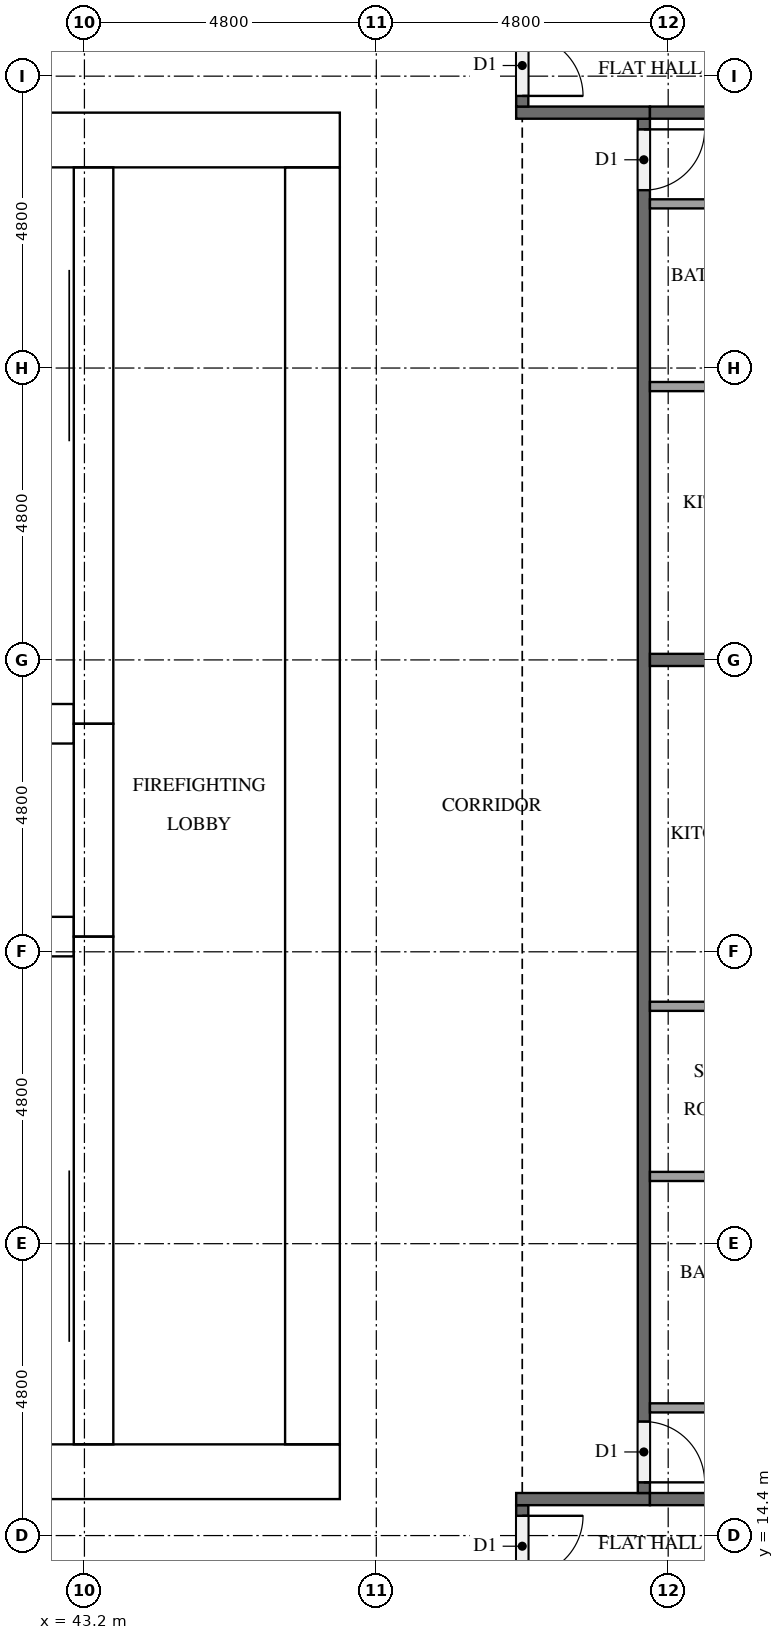
"""IFC4 building model, lengths in metres.
Left out: names, types, materials, properties, quantities, classifications, styles, units other than length and angle.
Written with IfcOpenShell. Run it as: python <this file> out.ifc"""

import sys

from ifc_helpers import new_model, si_unit, direction, frame, frame_2d, origin, place, context, subcontext, project, spatial, rectangle, extrude, element, fill, save


model = new_model("IFC4")
c1 = context("Model", 3, precision=1e-05, world=origin(), true_north=direction((0.0, 1.0)))
c2 = subcontext(c1, "Body", "Model", "MODEL_VIEW")
j1 = project(units=[si_unit("LENGTHUNIT", "METRE"), si_unit("PLANEANGLEUNIT", "RADIAN")], contexts=[c1])
p1 = place(None, origin())
s1 = spatial("IfcSite", under=j1, at=p1, CompositionType="ELEMENT")
p2 = place(p1, origin())
s2 = spatial("IfcBuilding", under=s1, at=p2, CompositionType="ELEMENT")
p3 = place(p2, frame((0.0, 0.0, 96.2)))
s3 = spatial("IfcBuildingStorey", under=s2, at=p3, CompositionType="ELEMENT", Elevation=96.2)
p4 = place(p3, frame((15.0, 15.45, 0.0), z_axis=(0.0, 0.0, 1.0), x_axis=(1.0, 0.0, 0.0)))
e1 = element("IfcWall", 1, at=p4, inside=s3, PredefinedType="SHEAR", context=c2, shape_type="SweptSolid", body=[
    extrude(rectangle(XDim=32.4, YDim=0.9, at=frame_2d((16.2, 0.0))), origin(), (0.0, 0.0, 1.0), 3.2),
])
p5 = place(p4, frame((15.3, 0.0, 0.0)))
e2 = element("IfcOpeningElement", 2, at=p5, cuts=e1, PredefinedType="OPENING", context=c2, shape_type="SweptSolid", body=[
    extrude(rectangle(XDim=1.8, YDim=2.1, at=frame_2d((0.9, 1.05))), frame((0.0, 0.46, 0.0), z_axis=(0.0, -1.0, 0.0), x_axis=(1.0, 0.0, 0.0)), (0.0, 0.0, 1.0), 0.92),
])
p6 = place(p3, frame((15.0, 37.35, 0.0), z_axis=(0.0, 0.0, 1.0), x_axis=(1.0, 0.0, 0.0)))
e3 = element("IfcWall", 3, at=p6, inside=s3, PredefinedType="SHEAR", context=c2, shape_type="SweptSolid", body=[
    extrude(rectangle(XDim=32.4, YDim=0.9, at=frame_2d((16.2, 0.0))), origin(), (0.0, 0.0, 1.0), 3.2),
])
p7 = place(p6, frame((15.3, 0.0, 0.0)))
e4 = element("IfcOpeningElement", 4, at=p7, cuts=e3, PredefinedType="OPENING", context=c2, shape_type="SweptSolid", body=[
    extrude(rectangle(XDim=1.8, YDim=2.1, at=frame_2d((0.9, 1.05))), frame((0.0, 0.46, 0.0), z_axis=(0.0, -1.0, 0.0), x_axis=(1.0, 0.0, 0.0)), (0.0, 0.0, 1.0), 0.92),
])
p8 = place(p6, frame((1.794, 0.0, 0.0)))
e5 = element("IfcOpeningElement", 5, at=p8, cuts=e3, PredefinedType="OPENING", context=c2, shape_type="SweptSolid", body=[
    extrude(rectangle(XDim=1.0, YDim=2.1, at=frame_2d((0.5, 1.05))), frame((0.0, 0.46, 0.0), z_axis=(0.0, -1.0, 0.0), x_axis=(1.0, 0.0, 0.0)), (0.0, 0.0, 1.0), 0.92),
])
p9 = place(p6, frame((5.331, 0.0, 0.0)))
e6 = element("IfcOpeningElement", 6, at=p9, cuts=e3, PredefinedType="OPENING", context=c2, shape_type="SweptSolid", body=[
    extrude(rectangle(XDim=1.0, YDim=2.1, at=frame_2d((0.5, 1.05))), frame((0.0, 0.46, 0.0), z_axis=(0.0, -1.0, 0.0), x_axis=(1.0, 0.0, 0.0)), (0.0, 0.0, 1.0), 0.92),
])
p10 = place(p3, frame((46.95, 15.9, 0.0), z_axis=(0.0, 0.0, 1.0), x_axis=(0.0, 1.0, 0.0)))
e7 = element("IfcWall", 7, at=p10, inside=s3, PredefinedType="SHEAR", context=c2, shape_type="SweptSolid", body=[
    extrude(rectangle(XDim=21.0, YDim=0.9, at=frame_2d((10.5, 0.0))), origin(), (0.0, 0.0, 1.0), 3.2),
])
p11 = place(p10, frame((10.2, 0.0, 0.0)))
e8 = element("IfcOpeningElement", 8, at=p11, cuts=e7, PredefinedType="OPENING", context=c2, shape_type="SweptSolid", body=[
    extrude(rectangle(XDim=1.2, YDim=2.1, at=frame_2d((0.6, 1.05))), frame((0.0, 0.46, 0.0), z_axis=(0.0, -1.0, 0.0), x_axis=(1.0, 0.0, 0.0)), (0.0, 0.0, 1.0), 0.92),
])
p12 = place(p3, frame((43.35, 15.9, 0.0), z_axis=(0.0, 0.0, 1.0), x_axis=(0.0, 1.0, 0.0)))
e9 = element("IfcWall", 9, at=p12, inside=s3, PredefinedType="SHEAR", context=c2, shape_type="SweptSolid", body=[
    extrude(rectangle(XDim=8.35, YDim=0.65, at=frame_2d((4.175, 0.0))), origin(), (0.0, 0.0, 1.0), 3.2),
])
p13 = place(p12, frame((0.3, 0.0, 0.0)))
e10 = element("IfcOpeningElement", 10, at=p13, cuts=e9, PredefinedType="OPENING", context=c2, shape_type="SweptSolid", body=[
    extrude(rectangle(XDim=1.2, YDim=2.1, at=frame_2d((0.6, 1.05))), frame((0.0, 0.335, 0.0), z_axis=(0.0, -1.0, 0.0), x_axis=(1.0, 0.0, 0.0)), (0.0, 0.0, 1.0), 0.67),
])
p14 = place(p3, frame((43.35, 24.25, 0.0), z_axis=(0.0, 0.0, 1.0), x_axis=(0.0, 1.0, 0.0)))
e11 = element("IfcWall", 11, at=p14, inside=s3, PredefinedType="SHEAR", context=c2, shape_type="SweptSolid", body=[
    extrude(rectangle(XDim=3.5, YDim=0.65, at=frame_2d((1.75, 0.0))), origin(), (0.0, 0.0, 1.0), 3.2),
])
p15 = place(p14, frame((1.2, 0.0, 0.0)))
e12 = element("IfcOpeningElement", 12, at=p15, cuts=e11, PredefinedType="OPENING", context=c2, shape_type="SweptSolid", body=[
    extrude(rectangle(XDim=1.1, YDim=2.1, at=frame_2d((0.55, 1.05))), frame((0.0, 0.335, 0.0), z_axis=(0.0, -1.0, 0.0), x_axis=(1.0, 0.0, 0.0)), (0.0, 0.0, 1.0), 0.67),
])
p16 = place(p3, frame((43.35, 27.75, 0.0), z_axis=(0.0, 0.0, 1.0), x_axis=(0.0, 1.0, 0.0)))
e13 = element("IfcWall", 13, at=p16, inside=s3, PredefinedType="SHEAR", context=c2, shape_type="SweptSolid", body=[
    extrude(rectangle(XDim=9.15, YDim=0.65, at=frame_2d((4.575, 0.0))), origin(), (0.0, 0.0, 1.0), 3.2),
])
p17 = place(p16, frame((7.65, 0.0, 0.0)))
e14 = element("IfcOpeningElement", 14, at=p17, cuts=e13, PredefinedType="OPENING", context=c2, shape_type="SweptSolid", body=[
    extrude(rectangle(XDim=1.2, YDim=2.1, at=frame_2d((0.6, 1.05))), frame((0.0, 0.335, 0.0), z_axis=(0.0, -1.0, 0.0), x_axis=(1.0, 0.0, 0.0)), (0.0, 0.0, 1.0), 0.67),
])
for number, where, z_axis, x_axis in (
    (15, (39.625, 24.25, 0.0), (0.0, 0.0, 1.0), (1.0, 0.0, 0.0)),
    (16, (39.625, 27.75, 0.0), (0.0, 0.0, 1.0), (1.0, 0.0, 0.0)),
):
    element("IfcWall", number, at=place(p3, frame(where, z_axis=z_axis, x_axis=x_axis)), inside=s3, PredefinedType="SHEAR", context=c2, shape_type="SweptSolid", body=[
        extrude(rectangle(XDim=3.4, YDim=0.65, at=frame_2d((1.7, 0.0))), origin(), (0.0, 0.0, 1.0), 3.2),
    ])
p18 = place(p3, frame((50.4, 14.9, 0.0), z_axis=(0.0, 0.0, 1.0), x_axis=(0.0, -1.0, 0.0)))
e17 = element("IfcWall", 17, at=p18, inside=s3, PredefinedType="PARTITIONING", context=c2, shape_type="SweptSolid", body=[
    extrude(rectangle(XDim=2.8, YDim=0.2, at=frame_2d((1.4, 0.0))), origin(), (0.0, 0.0, 1.0), 3.2),
])
p19 = place(p18, frame((0.175, 0.0, 0.0)))
e18 = element("IfcOpeningElement", 18, at=p19, cuts=e17, PredefinedType="OPENING", context=c2, shape_type="SweptSolid", body=[
    extrude(rectangle(XDim=1.0, YDim=2.1, at=frame_2d((0.5, 1.05))), frame((0.0, 0.11, 0.0), z_axis=(0.0, -1.0, 0.0), x_axis=(1.0, 0.0, 0.0)), (0.0, 0.0, 1.0), 0.22),
])
p20 = place(p3, frame((50.3, 15.0, 0.0), z_axis=(0.0, 0.0, 1.0), x_axis=(1.0, 0.0, 0.0)))
e19 = element("IfcWall", 19, at=p20, inside=s3, PredefinedType="PARTITIONING", context=c2, shape_type="SweptSolid", body=[
    extrude(rectangle(XDim=2.2, YDim=0.2, at=frame_2d((1.1, 0.0))), origin(), (0.0, 0.0, 1.0), 3.2),
])
p21 = place(p3, frame((52.4, 37.7, 0.0), z_axis=(0.0, 0.0, 1.0), x_axis=(0.0, -1.0, 0.0)))
e20 = element("IfcWall", 20, at=p21, inside=s3, PredefinedType="PARTITIONING", context=c2, shape_type="SweptSolid", body=[
    extrude(rectangle(XDim=22.6, YDim=0.2, at=frame_2d((11.3, 0.0))), origin(), (0.0, 0.0, 1.0), 3.2),
])
p22 = place(p21, frame((21.425, 0.0, 0.0)))
e21 = element("IfcOpeningElement", 21, at=p22, cuts=e20, PredefinedType="OPENING", context=c2, shape_type="SweptSolid", body=[
    extrude(rectangle(XDim=1.0, YDim=2.1, at=frame_2d((0.5, 1.05))), frame((0.0, 0.11, 0.0), z_axis=(0.0, -1.0, 0.0), x_axis=(1.0, 0.0, 0.0)), (0.0, 0.0, 1.0), 0.22),
])
p23 = place(p21, frame((0.175, 0.0, 0.0)))
e22 = element("IfcOpeningElement", 22, at=p23, cuts=e20, PredefinedType="OPENING", context=c2, shape_type="SweptSolid", body=[
    extrude(rectangle(XDim=1.0, YDim=2.1, at=frame_2d((0.5, 1.05))), frame((0.0, 0.11, 0.0), z_axis=(0.0, -1.0, 0.0), x_axis=(1.0, 0.0, 0.0)), (0.0, 0.0, 1.0), 0.22),
])
p24 = place(p3, frame((52.5, 37.8, 0.0), z_axis=(0.0, 0.0, 1.0), x_axis=(-1.0, 0.0, 0.0)))
e23 = element("IfcWall", 23, at=p24, inside=s3, PredefinedType="PARTITIONING", context=c2, shape_type="SweptSolid", body=[
    extrude(rectangle(XDim=2.2, YDim=0.2, at=frame_2d((1.1, 0.0))), origin(), (0.0, 0.0, 1.0), 3.2),
])
p25 = place(p3, frame((50.4, 40.7, 0.0), z_axis=(0.0, 0.0, 1.0), x_axis=(0.0, -1.0, 0.0)))
e24 = element("IfcWall", 24, at=p25, inside=s3, PredefinedType="PARTITIONING", context=c2, shape_type="SweptSolid", body=[
    extrude(rectangle(XDim=2.8, YDim=0.2, at=frame_2d((1.4, 0.0))), origin(), (0.0, 0.0, 1.0), 3.2),
])
p26 = place(p25, frame((1.625, 0.0, 0.0)))
e25 = element("IfcOpeningElement", 25, at=p26, cuts=e24, PredefinedType="OPENING", context=c2, shape_type="SweptSolid", body=[
    extrude(rectangle(XDim=1.0, YDim=2.1, at=frame_2d((0.5, 1.05))), frame((0.0, 0.11, 0.0), z_axis=(0.0, -1.0, 0.0), x_axis=(1.0, 0.0, 0.0)), (0.0, 0.0, 1.0), 0.22),
])
p27 = place(p3, frame((52.5, 15.0, 0.0), z_axis=(0.0, 0.0, 1.0), x_axis=(1.0, 0.0, 0.0)))
e26 = element("IfcWall", 26, at=p27, inside=s3, PredefinedType="PARTITIONING", context=c2, shape_type="SweptSolid", body=[
    extrude(rectangle(XDim=9.8, YDim=0.2, at=frame_2d((4.9, 0.0))), origin(), (0.0, 0.0, 1.0), 3.2),
])
for number, where, z_axis, x_axis in (
    (27, (52.5, 28.8, 0.0), (0.0, 0.0, 1.0), (1.0, 0.0, 0.0)),
    (28, (52.5, 37.8, 0.0), (0.0, 0.0, 1.0), (1.0, 0.0, 0.0)),
):
    element("IfcWall", number, at=place(p3, frame(where, z_axis=z_axis, x_axis=x_axis)), inside=s3, PredefinedType="PARTITIONING", context=c2, shape_type="SweptSolid", body=[
        extrude(rectangle(XDim=9.475, YDim=0.2, at=frame_2d((4.738, 0.0))), origin(), (0.0, 0.0, 1.0), 3.2),
    ])
for number, where, z_axis, x_axis in (
    (29, (52.5, 20.306, 0.0), (0.0, 0.0, 1.0), (1.0, 0.0, 0.0)),
    (30, (52.5, 23.104, 0.0), (0.0, 0.0, 1.0), (1.0, 0.0, 0.0)),
):
    element("IfcWall", number, at=place(p3, frame(where, z_axis=z_axis, x_axis=x_axis)), inside=s3, PredefinedType="PARTITIONING", context=c2, shape_type="SweptSolid", body=[
        extrude(rectangle(XDim=2.775, YDim=0.15, at=frame_2d((1.387, 0.0))), origin(), (0.0, 0.0, 1.0), 3.2),
    ])
p28 = place(p3, frame((52.5, 16.5, 0.0), z_axis=(0.0, 0.0, 1.0), x_axis=(1.0, 0.0, 0.0)))
e31 = element("IfcWall", 31, at=p28, inside=s3, PredefinedType="PARTITIONING", context=c2, shape_type="SweptSolid", body=[
    extrude(rectangle(XDim=2.925, YDim=0.15, at=frame_2d((1.462, 0.0))), origin(), (0.0, 0.0, 1.0), 3.2),
])
p29 = place(p3, frame((52.5, 33.295, 0.0), z_axis=(0.0, 0.0, 1.0), x_axis=(1.0, 0.0, 0.0)))
e32 = element("IfcWall", 32, at=p29, inside=s3, PredefinedType="PARTITIONING", context=c2, shape_type="SweptSolid", body=[
    extrude(rectangle(XDim=2.475, YDim=0.15, at=frame_2d((1.238, 0.0))), origin(), (0.0, 0.0, 1.0), 3.2),
])
p30 = place(p3, frame((52.5, 36.3, 0.0), z_axis=(0.0, 0.0, 1.0), x_axis=(1.0, 0.0, 0.0)))
e33 = element("IfcWall", 33, at=p30, inside=s3, PredefinedType="PARTITIONING", context=c2, shape_type="SweptSolid", body=[
    extrude(rectangle(XDim=2.625, YDim=0.15, at=frame_2d((1.312, 0.0))), origin(), (0.0, 0.0, 1.0), 3.2),
])
p31 = place(p15, origin())
e34 = element("IfcDoor", 34, at=p31, inside=s3, OperationType="DOUBLE_DOOR_SLIDING", PredefinedType="DOOR", context=c2, shape_type="SweptSolid", body=[
    extrude(rectangle(XDim=1.1, YDim=2.1, at=frame_2d((0.55, 1.05))), frame((0.0, 0.025, 0.0), z_axis=(0.0, -1.0, 0.0), x_axis=(1.0, 0.0, 0.0)), (0.0, 0.0, 1.0), 0.05),
])
fill(e12, e34)
p32 = place(p13, origin())
e35 = element("IfcDoor", 35, at=p32, inside=s3, OperationType="SINGLE_SWING_LEFT", PredefinedType="DOOR", context=c2, shape_type="SweptSolid", body=[
    extrude(rectangle(XDim=1.2, YDim=2.1, at=frame_2d((0.6, 1.05))), frame((0.0, 0.025, 0.0), z_axis=(0.0, -1.0, 0.0), x_axis=(1.0, 0.0, 0.0)), (0.0, 0.0, 1.0), 0.05),
])
fill(e10, e35)
p33 = place(p17, origin())
e36 = element("IfcDoor", 36, at=p33, inside=s3, OperationType="SINGLE_SWING_RIGHT", PredefinedType="DOOR", context=c2, shape_type="SweptSolid", body=[
    extrude(rectangle(XDim=1.2, YDim=2.1, at=frame_2d((0.6, 1.05))), frame((0.0, 0.025, 0.0), z_axis=(0.0, -1.0, 0.0), x_axis=(1.0, 0.0, 0.0)), (0.0, 0.0, 1.0), 0.05),
])
fill(e14, e36)
p34 = place(p11, origin())
e37 = element("IfcDoor", 37, at=p34, inside=s3, OperationType="SINGLE_SWING_RIGHT", PredefinedType="DOOR", context=c2, shape_type="SweptSolid", body=[
    extrude(rectangle(XDim=1.2, YDim=2.1, at=frame_2d((0.6, 1.05))), frame((0.0, 0.025, 0.0), z_axis=(0.0, -1.0, 0.0), x_axis=(1.0, 0.0, 0.0)), (0.0, 0.0, 1.0), 0.05),
])
fill(e8, e37)
p35 = place(p19, origin())
e38 = element("IfcDoor", 38, at=p35, inside=s3, OperationType="SINGLE_SWING_LEFT", PredefinedType="DOOR", context=c2, shape_type="SweptSolid", body=[
    extrude(rectangle(XDim=1.0, YDim=2.1, at=frame_2d((0.5, 1.05))), frame((0.0, 0.025, 0.0), z_axis=(0.0, -1.0, 0.0), x_axis=(1.0, 0.0, 0.0)), (0.0, 0.0, 1.0), 0.05),
])
fill(e18, e38)
p36 = place(p22, origin())
e39 = element("IfcDoor", 39, at=p36, inside=s3, OperationType="SINGLE_SWING_RIGHT", PredefinedType="DOOR", context=c2, shape_type="SweptSolid", body=[
    extrude(rectangle(XDim=1.0, YDim=2.1, at=frame_2d((0.5, 1.05))), frame((0.0, 0.025, 0.0), z_axis=(0.0, -1.0, 0.0), x_axis=(1.0, 0.0, 0.0)), (0.0, 0.0, 1.0), 0.05),
])
fill(e21, e39)
p37 = place(p23, origin())
e40 = element("IfcDoor", 40, at=p37, inside=s3, OperationType="SINGLE_SWING_LEFT", PredefinedType="DOOR", context=c2, shape_type="SweptSolid", body=[
    extrude(rectangle(XDim=1.0, YDim=2.1, at=frame_2d((0.5, 1.05))), frame((0.0, 0.025, 0.0), z_axis=(0.0, -1.0, 0.0), x_axis=(1.0, 0.0, 0.0)), (0.0, 0.0, 1.0), 0.05),
])
fill(e22, e40)
p38 = place(p26, origin())
e41 = element("IfcDoor", 41, at=p38, inside=s3, OperationType="SINGLE_SWING_RIGHT", PredefinedType="DOOR", context=c2, shape_type="SweptSolid", body=[
    extrude(rectangle(XDim=1.0, YDim=2.1, at=frame_2d((0.5, 1.05))), frame((0.0, 0.025, 0.0), z_axis=(0.0, -1.0, 0.0), x_axis=(1.0, 0.0, 0.0)), (0.0, 0.0, 1.0), 0.05),
])
fill(e25, e41)
save(model, sys.argv[1])
